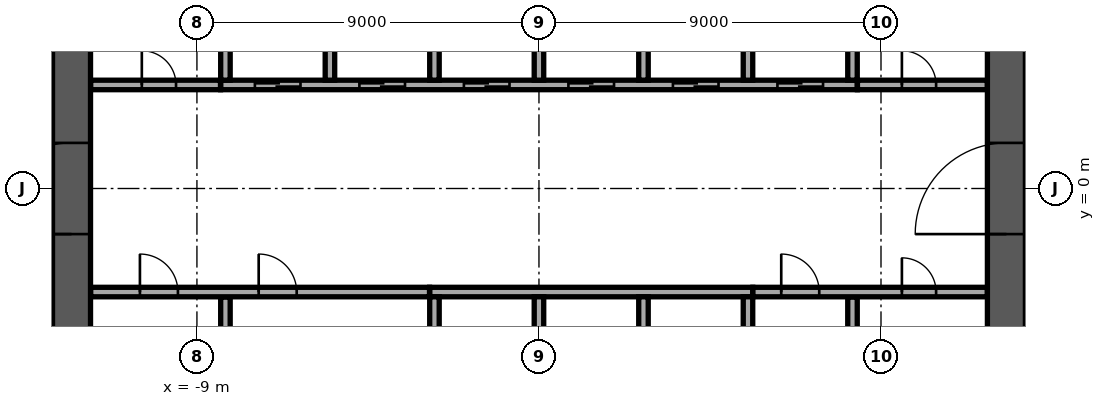
"""IFC4 building model, lengths in metres.
Left out: names, types, materials, properties, quantities, classifications, styles, units other than length and angle.
Written with IfcOpenShell. Run it as: python <this file> out.ifc"""

import sys

from ifc_helpers import new_model, si_unit, direction, frame, frame_2d, origin, place, context, subcontext, project, spatial, rectangle, extrude, element, fill, save


model = new_model("IFC4")
c1 = context("Model", 3, precision=1e-05, world=origin(), true_north=direction((0.0, 1.0)))
c2 = subcontext(c1, "Body", "Model", "MODEL_VIEW")
j1 = project(units=[si_unit("LENGTHUNIT", "METRE"), si_unit("PLANEANGLEUNIT", "RADIAN")], contexts=[c1])
p1 = place(None, origin())
s1 = spatial("IfcSite", under=j1, at=p1, CompositionType="ELEMENT")
p2 = place(p1, origin())
s2 = spatial("IfcBuilding", under=s1, at=p2, CompositionType="ELEMENT")
p3 = place(p2, frame((0.0, 0.0, 147.7)))
s3 = spatial("IfcBuildingStorey", under=s2, at=p3, CompositionType="ELEMENT", Elevation=147.7)
p4 = place(p3, frame((12.3, -11.8, 0.0), z_axis=(0.0, 0.0, 1.0), x_axis=(0.0, 1.0, 0.0)))
e1 = element("IfcWall", 1, at=p4, inside=s3, PredefinedType="SHEAR", context=c2, shape_type="SweptSolid", body=[
    extrude(rectangle(XDim=23.6, YDim=1.0, at=frame_2d((11.8, 0.0))), origin(), (0.0, 0.0, 1.0), 3.6),
])
p5 = place(p4, frame((10.6, 0.0, 0.0)))
e2 = element("IfcOpeningElement", 2, at=p5, cuts=e1, PredefinedType="OPENING", context=c2, shape_type="SweptSolid", body=[
    extrude(rectangle(XDim=2.4, YDim=2.4, at=frame_2d((1.2, 1.2))), frame((0.0, 0.51, 0.0), z_axis=(0.0, -1.0, 0.0), x_axis=(1.0, 0.0, 0.0)), (0.0, 0.0, 1.0), 1.02),
])
p6 = place(p3, frame((-12.3, -11.8, 0.0), z_axis=(0.0, 0.0, 1.0), x_axis=(0.0, 1.0, 0.0)))
e3 = element("IfcWall", 3, at=p6, inside=s3, PredefinedType="SHEAR", context=c2, shape_type="SweptSolid", body=[
    extrude(rectangle(XDim=23.6, YDim=1.0, at=frame_2d((11.8, 0.0))), origin(), (0.0, 0.0, 1.0), 3.6),
])
p7 = place(p6, frame((10.6, 0.0, 0.0)))
e4 = element("IfcOpeningElement", 4, at=p7, cuts=e3, PredefinedType="OPENING", context=c2, shape_type="SweptSolid", body=[
    extrude(rectangle(XDim=2.4, YDim=2.4, at=frame_2d((1.2, 1.2))), frame((0.0, 0.51, 0.0), z_axis=(0.0, -1.0, 0.0), x_axis=(1.0, 0.0, 0.0)), (0.0, 0.0, 1.0), 1.02),
])
p8 = place(p3, frame((-8.375, 2.725, 0.0), z_axis=(0.0, 0.0, 1.0), x_axis=(1.0, 0.0, 0.0)))
e5 = element("IfcWall", 5, at=p8, inside=s3, PredefinedType="SOLIDWALL", context=c2, shape_type="SweptSolid", body=[
    extrude(rectangle(XDim=16.75, YDim=0.25, at=frame_2d((8.375, 0.0))), origin(), (0.0, 0.0, 1.0), 3.6),
])
p9 = place(p8, frame((0.9, 0.0, 0.0)))
e6 = element("IfcOpeningElement", 6, at=p9, cuts=e5, PredefinedType="OPENING", context=c2, shape_type="SweptSolid", body=[
    extrude(rectangle(XDim=1.2, YDim=2.1, at=frame_2d((0.6, 1.05))), frame((0.0, 0.135, 0.0), z_axis=(0.0, -1.0, 0.0), x_axis=(1.0, 0.0, 0.0)), (0.0, 0.0, 1.0), 0.27),
])
p10 = place(p8, frame((3.65, 0.0, 0.0)))
e7 = element("IfcOpeningElement", 7, at=p10, cuts=e5, PredefinedType="OPENING", context=c2, shape_type="SweptSolid", body=[
    extrude(rectangle(XDim=1.2, YDim=2.1, at=frame_2d((0.6, 1.05))), frame((0.0, 0.135, 0.0), z_axis=(0.0, -1.0, 0.0), x_axis=(1.0, 0.0, 0.0)), (0.0, 0.0, 1.0), 0.27),
])
p11 = place(p8, frame((6.4, 0.0, 0.0)))
e8 = element("IfcOpeningElement", 8, at=p11, cuts=e5, PredefinedType="OPENING", context=c2, shape_type="SweptSolid", body=[
    extrude(rectangle(XDim=1.2, YDim=2.1, at=frame_2d((0.6, 1.05))), frame((0.0, 0.135, 0.0), z_axis=(0.0, -1.0, 0.0), x_axis=(1.0, 0.0, 0.0)), (0.0, 0.0, 1.0), 0.27),
])
p12 = place(p8, frame((9.15, 0.0, 0.0)))
e9 = element("IfcOpeningElement", 9, at=p12, cuts=e5, PredefinedType="OPENING", context=c2, shape_type="SweptSolid", body=[
    extrude(rectangle(XDim=1.2, YDim=2.1, at=frame_2d((0.6, 1.05))), frame((0.0, 0.135, 0.0), z_axis=(0.0, -1.0, 0.0), x_axis=(1.0, 0.0, 0.0)), (0.0, 0.0, 1.0), 0.27),
])
p13 = place(p8, frame((11.9, 0.0, 0.0)))
e10 = element("IfcOpeningElement", 10, at=p13, cuts=e5, PredefinedType="OPENING", context=c2, shape_type="SweptSolid", body=[
    extrude(rectangle(XDim=1.2, YDim=2.1, at=frame_2d((0.6, 1.05))), frame((0.0, 0.135, 0.0), z_axis=(0.0, -1.0, 0.0), x_axis=(1.0, 0.0, 0.0)), (0.0, 0.0, 1.0), 0.27),
])
p14 = place(p8, frame((14.65, 0.0, 0.0)))
e11 = element("IfcOpeningElement", 11, at=p14, cuts=e5, PredefinedType="OPENING", context=c2, shape_type="SweptSolid", body=[
    extrude(rectangle(XDim=1.2, YDim=2.1, at=frame_2d((0.6, 1.05))), frame((0.0, 0.135, 0.0), z_axis=(0.0, -1.0, 0.0), x_axis=(1.0, 0.0, 0.0)), (0.0, 0.0, 1.0), 0.27),
])
for number, where, z_axis, x_axis in (
    (12, (-8.25, 2.85, 0.0), (0.0, 0.0, 1.0), (0.0, 1.0, 0.0)),
    (13, (-5.5, 2.85, 0.0), (0.0, 0.0, 1.0), (0.0, 1.0, 0.0)),
    (14, (-2.75, 2.85, 0.0), (0.0, 0.0, 1.0), (0.0, 1.0, 0.0)),
    (15, (0.0, 2.85, 0.0), (0.0, 0.0, 1.0), (0.0, 1.0, 0.0)),
    (16, (2.75, 2.85, 0.0), (0.0, 0.0, 1.0), (0.0, 1.0, 0.0)),
    (17, (5.5, 2.85, 0.0), (0.0, 0.0, 1.0), (0.0, 1.0, 0.0)),
    (18, (8.25, 2.85, 0.0), (0.0, 0.0, 1.0), (0.0, 1.0, 0.0)),
):
    element("IfcWall", number, at=place(p3, frame(where, z_axis=z_axis, x_axis=x_axis)), inside=s3, PredefinedType="SOLIDWALL", context=c2, shape_type="SweptSolid", body=[
        extrude(rectangle(XDim=2.7, YDim=0.25, at=frame_2d((1.35, 0.0))), origin(), (0.0, 0.0, 1.0), 3.6),
    ])
p15 = place(p3, frame((-2.875, -2.725, 0.0), z_axis=(0.0, 0.0, 1.0), x_axis=(1.0, 0.0, 0.0)))
e19 = element("IfcWall", 19, at=p15, inside=s3, PredefinedType="SOLIDWALL", context=c2, shape_type="SweptSolid", body=[
    extrude(rectangle(XDim=8.5, YDim=0.25, at=frame_2d((4.25, 0.0))), origin(), (0.0, 0.0, 1.0), 3.6),
])
for number, where, z_axis, x_axis in (
    (20, (-2.75, -5.55, 0.0), (0.0, 0.0, 1.0), (0.0, 1.0, 0.0)),
    (21, (0.0, -5.55, 0.0), (0.0, 0.0, 1.0), (0.0, 1.0, 0.0)),
    (22, (2.75, -5.55, 0.0), (0.0, 0.0, 1.0), (0.0, 1.0, 0.0)),
    (23, (5.5, -5.55, 0.0), (0.0, 0.0, 1.0), (0.0, 1.0, 0.0)),
):
    element("IfcWall", number, at=place(p3, frame(where, z_axis=z_axis, x_axis=x_axis)), inside=s3, PredefinedType="SOLIDWALL", context=c2, shape_type="SweptSolid", body=[
        extrude(rectangle(XDim=2.7, YDim=0.25, at=frame_2d((1.35, 0.0))), origin(), (0.0, 0.0, 1.0), 3.6),
    ])
for number, where, z_axis, x_axis in (
    (24, (-8.25, -5.545, 0.0), (0.0, 0.0, 1.0), (0.0, 1.0, 0.0)),
    (25, (8.25, -5.545, 0.0), (0.0, 0.0, 1.0), (0.0, 1.0, 0.0)),
):
    element("IfcWall", number, at=place(p3, frame(where, z_axis=z_axis, x_axis=x_axis)), inside=s3, PredefinedType="PARTITIONING", context=c2, shape_type="SweptSolid", body=[
        extrude(rectangle(XDim=2.69, YDim=0.25, at=frame_2d((1.345, 0.0))), origin(), (0.0, 0.0, 1.0), 3.6),
    ])
p16 = place(p3, frame((-11.795, -2.725, 0.0), z_axis=(0.0, 0.0, 1.0), x_axis=(1.0, 0.0, 0.0)))
e26 = element("IfcWall", 26, at=p16, inside=s3, PredefinedType="PARTITIONING", context=c2, shape_type="SweptSolid", body=[
    extrude(rectangle(XDim=8.915, YDim=0.25, at=frame_2d((4.458, 0.0))), origin(), (0.0, 0.0, 1.0), 3.6),
])
p17 = place(p16, frame((1.295, 0.0, 0.0)))
e27 = element("IfcOpeningElement", 27, at=p17, cuts=e26, PredefinedType="OPENING", context=c2, shape_type="SweptSolid", body=[
    extrude(rectangle(XDim=1.0, YDim=2.1, at=frame_2d((0.5, 1.05))), frame((0.0, 0.135, 0.0), z_axis=(0.0, -1.0, 0.0), x_axis=(1.0, 0.0, 0.0)), (0.0, 0.0, 1.0), 0.27),
])
p18 = place(p16, frame((4.42, 0.0, 0.0)))
e28 = element("IfcOpeningElement", 28, at=p18, cuts=e26, PredefinedType="OPENING", context=c2, shape_type="SweptSolid", body=[
    extrude(rectangle(XDim=1.0, YDim=2.1, at=frame_2d((0.5, 1.05))), frame((0.0, 0.135, 0.0), z_axis=(0.0, -1.0, 0.0), x_axis=(1.0, 0.0, 0.0)), (0.0, 0.0, 1.0), 0.27),
])
p19 = place(p3, frame((5.63, -2.725, 0.0), z_axis=(0.0, 0.0, 1.0), x_axis=(1.0, 0.0, 0.0)))
e29 = element("IfcWall", 29, at=p19, inside=s3, PredefinedType="PARTITIONING", context=c2, shape_type="SweptSolid", body=[
    extrude(rectangle(XDim=6.165, YDim=0.25, at=frame_2d((3.083, 0.0))), origin(), (0.0, 0.0, 1.0), 3.6),
])
p20 = place(p19, frame((0.745, 0.0, 0.0)))
e30 = element("IfcOpeningElement", 30, at=p20, cuts=e29, PredefinedType="OPENING", context=c2, shape_type="SweptSolid", body=[
    extrude(rectangle(XDim=1.0, YDim=2.1, at=frame_2d((0.5, 1.05))), frame((0.0, 0.135, 0.0), z_axis=(0.0, -1.0, 0.0), x_axis=(1.0, 0.0, 0.0)), (0.0, 0.0, 1.0), 0.27),
])
p21 = place(p19, frame((3.92, 0.0, 0.0)))
e31 = element("IfcOpeningElement", 31, at=p21, cuts=e29, PredefinedType="OPENING", context=c2, shape_type="SweptSolid", body=[
    extrude(rectangle(XDim=0.9, YDim=2.1, at=frame_2d((0.45, 1.05))), frame((0.0, 0.135, 0.0), z_axis=(0.0, -1.0, 0.0), x_axis=(1.0, 0.0, 0.0)), (0.0, 0.0, 1.0), 0.27),
])
p22 = place(p3, frame((-11.795, 2.725, 0.0), z_axis=(0.0, 0.0, 1.0), x_axis=(1.0, 0.0, 0.0)))
e32 = element("IfcWall", 32, at=p22, inside=s3, PredefinedType="PARTITIONING", context=c2, shape_type="SweptSolid", body=[
    extrude(rectangle(XDim=3.415, YDim=0.25, at=frame_2d((1.708, 0.0))), origin(), (0.0, 0.0, 1.0), 3.6),
])
p23 = place(p22, frame((1.345, 0.0, 0.0)))
e33 = element("IfcOpeningElement", 33, at=p23, cuts=e32, PredefinedType="OPENING", context=c2, shape_type="SweptSolid", body=[
    extrude(rectangle(XDim=0.9, YDim=2.1, at=frame_2d((0.45, 1.05))), frame((0.0, 0.135, 0.0), z_axis=(0.0, -1.0, 0.0), x_axis=(1.0, 0.0, 0.0)), (0.0, 0.0, 1.0), 0.27),
])
p24 = place(p3, frame((8.38, 2.725, 0.0), z_axis=(0.0, 0.0, 1.0), x_axis=(1.0, 0.0, 0.0)))
e34 = element("IfcWall", 34, at=p24, inside=s3, PredefinedType="PARTITIONING", context=c2, shape_type="SweptSolid", body=[
    extrude(rectangle(XDim=3.415, YDim=0.25, at=frame_2d((1.708, 0.0))), origin(), (0.0, 0.0, 1.0), 3.6),
])
p25 = place(p24, frame((1.17, 0.0, 0.0)))
e35 = element("IfcOpeningElement", 35, at=p25, cuts=e34, PredefinedType="OPENING", context=c2, shape_type="SweptSolid", body=[
    extrude(rectangle(XDim=0.9, YDim=2.1, at=frame_2d((0.45, 1.05))), frame((0.0, 0.135, 0.0), z_axis=(0.0, -1.0, 0.0), x_axis=(1.0, 0.0, 0.0)), (0.0, 0.0, 1.0), 0.27),
])
p26 = place(p3, frame((-26.388, 0.711, 0.0), z_axis=(0.0, 0.0, 1.0), x_axis=(0.515060503771, -0.857153823684, 0.0)))
e36 = element("IfcWall", 36, at=p26, inside=s3, PredefinedType="PARTITIONING", context=c2, shape_type="SweptSolid", body=[
    extrude(rectangle(XDim=28.475, YDim=0.15, at=frame_2d((14.238, 0.0))), origin(), (0.0, 0.0, 1.0), 3.15),
])
p27 = place(p26, frame((9.447, 0.0, 0.0)))
e37 = element("IfcOpeningElement", 37, at=p27, cuts=e36, PredefinedType="OPENING", context=c2, shape_type="SweptSolid", body=[
    extrude(rectangle(XDim=1.0, YDim=2.1, at=frame_2d((0.5, 1.05))), frame((0.0, 0.085, 0.0), z_axis=(0.0, -1.0, 0.0), x_axis=(1.0, 0.0, 0.0)), (0.0, 0.0, 1.0), 0.17),
])
p28 = place(p26, frame((17.021, 0.0, 0.0)))
e38 = element("IfcOpeningElement", 38, at=p28, cuts=e36, PredefinedType="OPENING", context=c2, shape_type="SweptSolid", body=[
    extrude(rectangle(XDim=1.0, YDim=2.1, at=frame_2d((0.5, 1.05))), frame((0.0, 0.085, 0.0), z_axis=(0.0, -1.0, 0.0), x_axis=(1.0, 0.0, 0.0)), (0.0, 0.0, 1.0), 0.17),
])
p29 = place(p3, frame((11.76, 23.633, 0.0), z_axis=(0.0, 0.0, 1.0), x_axis=(0.515060503771, -0.857153823684, 0.0)))
e39 = element("IfcWall", 39, at=p29, inside=s3, PredefinedType="PARTITIONING", context=c2, shape_type="SweptSolid", body=[
    extrude(rectangle(XDim=28.475, YDim=0.15, at=frame_2d((14.238, 0.0))), origin(), (0.0, 0.0, 1.0), 3.15),
])
p30 = place(p29, frame((12.149, 0.0, 0.0)))
e40 = element("IfcOpeningElement", 40, at=p30, cuts=e39, PredefinedType="OPENING", context=c2, shape_type="SweptSolid", body=[
    extrude(rectangle(XDim=1.0, YDim=2.1, at=frame_2d((0.5, 1.05))), frame((0.0, 0.085, 0.0), z_axis=(0.0, -1.0, 0.0), x_axis=(1.0, 0.0, 0.0)), (0.0, 0.0, 1.0), 0.17),
])
p31 = place(p29, frame((19.62, 0.0, 0.0)))
e41 = element("IfcOpeningElement", 41, at=p31, cuts=e39, PredefinedType="OPENING", context=c2, shape_type="SweptSolid", body=[
    extrude(rectangle(XDim=1.0, YDim=2.1, at=frame_2d((0.5, 1.05))), frame((0.0, 0.085, 0.0), z_axis=(0.0, -1.0, 0.0), x_axis=(1.0, 0.0, 0.0)), (0.0, 0.0, 1.0), 0.17),
])
p32 = place(p29, frame((26.005, 0.0, 0.0)))
e42 = element("IfcOpeningElement", 42, at=p32, cuts=e39, PredefinedType="OPENING", context=c2, shape_type="SweptSolid", body=[
    extrude(rectangle(XDim=1.8, YDim=2.1, at=frame_2d((0.9, 1.05))), frame((0.0, 0.085, 0.0), z_axis=(0.0, -1.0, 0.0), x_axis=(1.0, 0.0, 0.0)), (0.0, 0.0, 1.0), 0.17),
])
p33 = place(p5, origin())
e43 = element("IfcDoor", 43, at=p33, inside=s3, OperationType="SINGLE_SWING_LEFT", PredefinedType="DOOR", context=c2, shape_type="SweptSolid", body=[
    extrude(rectangle(XDim=2.4, YDim=2.4, at=frame_2d((1.2, 1.2))), frame((0.0, 0.025, 0.0), z_axis=(0.0, -1.0, 0.0), x_axis=(1.0, 0.0, 0.0)), (0.0, 0.0, 1.0), 0.05),
])
fill(e2, e43)
p34 = place(p7, origin())
e44 = element("IfcDoor", 44, at=p34, inside=s3, OperationType="SINGLE_SWING_LEFT", PredefinedType="DOOR", context=c2, shape_type="SweptSolid", body=[
    extrude(rectangle(XDim=2.4, YDim=2.4, at=frame_2d((1.2, 1.2))), frame((0.0, 0.025, 0.0), z_axis=(0.0, -1.0, 0.0), x_axis=(1.0, 0.0, 0.0)), (0.0, 0.0, 1.0), 0.05),
])
fill(e4, e44)
p35 = place(p9, origin())
e45 = element("IfcDoor", 45, at=p35, inside=s3, OperationType="DOUBLE_DOOR_SLIDING", PredefinedType="DOOR", context=c2, shape_type="SweptSolid", body=[
    extrude(rectangle(XDim=1.2, YDim=2.1, at=frame_2d((0.6, 1.05))), frame((0.0, 0.025, 0.0), z_axis=(0.0, -1.0, 0.0), x_axis=(1.0, 0.0, 0.0)), (0.0, 0.0, 1.0), 0.05),
])
fill(e6, e45)
p36 = place(p10, origin())
e46 = element("IfcDoor", 46, at=p36, inside=s3, OperationType="DOUBLE_DOOR_SLIDING", PredefinedType="DOOR", context=c2, shape_type="SweptSolid", body=[
    extrude(rectangle(XDim=1.2, YDim=2.1, at=frame_2d((0.6, 1.05))), frame((0.0, 0.025, 0.0), z_axis=(0.0, -1.0, 0.0), x_axis=(1.0, 0.0, 0.0)), (0.0, 0.0, 1.0), 0.05),
])
fill(e7, e46)
p37 = place(p11, origin())
e47 = element("IfcDoor", 47, at=p37, inside=s3, OperationType="DOUBLE_DOOR_SLIDING", PredefinedType="DOOR", context=c2, shape_type="SweptSolid", body=[
    extrude(rectangle(XDim=1.2, YDim=2.1, at=frame_2d((0.6, 1.05))), frame((0.0, 0.025, 0.0), z_axis=(0.0, -1.0, 0.0), x_axis=(1.0, 0.0, 0.0)), (0.0, 0.0, 1.0), 0.05),
])
fill(e8, e47)
p38 = place(p12, origin())
e48 = element("IfcDoor", 48, at=p38, inside=s3, OperationType="DOUBLE_DOOR_SLIDING", PredefinedType="DOOR", context=c2, shape_type="SweptSolid", body=[
    extrude(rectangle(XDim=1.2, YDim=2.1, at=frame_2d((0.6, 1.05))), frame((0.0, 0.025, 0.0), z_axis=(0.0, -1.0, 0.0), x_axis=(1.0, 0.0, 0.0)), (0.0, 0.0, 1.0), 0.05),
])
fill(e9, e48)
p39 = place(p13, origin())
e49 = element("IfcDoor", 49, at=p39, inside=s3, OperationType="DOUBLE_DOOR_SLIDING", PredefinedType="DOOR", context=c2, shape_type="SweptSolid", body=[
    extrude(rectangle(XDim=1.2, YDim=2.1, at=frame_2d((0.6, 1.05))), frame((0.0, 0.025, 0.0), z_axis=(0.0, -1.0, 0.0), x_axis=(1.0, 0.0, 0.0)), (0.0, 0.0, 1.0), 0.05),
])
fill(e10, e49)
p40 = place(p14, origin())
e50 = element("IfcDoor", 50, at=p40, inside=s3, OperationType="DOUBLE_DOOR_SLIDING", PredefinedType="DOOR", context=c2, shape_type="SweptSolid", body=[
    extrude(rectangle(XDim=1.2, YDim=2.1, at=frame_2d((0.6, 1.05))), frame((0.0, 0.025, 0.0), z_axis=(0.0, -1.0, 0.0), x_axis=(1.0, 0.0, 0.0)), (0.0, 0.0, 1.0), 0.05),
])
fill(e11, e50)
p41 = place(p17, origin())
e51 = element("IfcDoor", 51, at=p41, inside=s3, OperationType="SINGLE_SWING_LEFT", PredefinedType="DOOR", context=c2, shape_type="SweptSolid", body=[
    extrude(rectangle(XDim=1.0, YDim=2.1, at=frame_2d((0.5, 1.05))), frame((0.0, 0.025, 0.0), z_axis=(0.0, -1.0, 0.0), x_axis=(1.0, 0.0, 0.0)), (0.0, 0.0, 1.0), 0.05),
])
fill(e27, e51)
p42 = place(p20, origin())
e52 = element("IfcDoor", 52, at=p42, inside=s3, OperationType="SINGLE_SWING_LEFT", PredefinedType="DOOR", context=c2, shape_type="SweptSolid", body=[
    extrude(rectangle(XDim=1.0, YDim=2.1, at=frame_2d((0.5, 1.05))), frame((0.0, 0.025, 0.0), z_axis=(0.0, -1.0, 0.0), x_axis=(1.0, 0.0, 0.0)), (0.0, 0.0, 1.0), 0.05),
])
fill(e30, e52)
p43 = place(p25, origin())
e53 = element("IfcDoor", 53, at=p43, inside=s3, OperationType="SINGLE_SWING_LEFT", PredefinedType="DOOR", context=c2, shape_type="SweptSolid", body=[
    extrude(rectangle(XDim=0.9, YDim=2.1, at=frame_2d((0.45, 1.05))), frame((0.0, 0.025, 0.0), z_axis=(0.0, -1.0, 0.0), x_axis=(1.0, 0.0, 0.0)), (0.0, 0.0, 1.0), 0.05),
])
fill(e35, e53)
p44 = place(p21, origin())
e54 = element("IfcDoor", 54, at=p44, inside=s3, OperationType="SINGLE_SWING_LEFT", PredefinedType="DOOR", context=c2, shape_type="SweptSolid", body=[
    extrude(rectangle(XDim=0.9, YDim=2.1, at=frame_2d((0.45, 1.05))), frame((0.0, 0.025, 0.0), z_axis=(0.0, -1.0, 0.0), x_axis=(1.0, 0.0, 0.0)), (0.0, 0.0, 1.0), 0.05),
])
fill(e31, e54)
p45 = place(p23, origin())
e55 = element("IfcDoor", 55, at=p45, inside=s3, OperationType="SINGLE_SWING_LEFT", PredefinedType="DOOR", context=c2, shape_type="SweptSolid", body=[
    extrude(rectangle(XDim=0.9, YDim=2.1, at=frame_2d((0.45, 1.05))), frame((0.0, 0.025, 0.0), z_axis=(0.0, -1.0, 0.0), x_axis=(1.0, 0.0, 0.0)), (0.0, 0.0, 1.0), 0.05),
])
fill(e33, e55)
p46 = place(p18, origin())
e56 = element("IfcDoor", 56, at=p46, inside=s3, OperationType="SINGLE_SWING_LEFT", PredefinedType="DOOR", context=c2, shape_type="SweptSolid", body=[
    extrude(rectangle(XDim=1.0, YDim=2.1, at=frame_2d((0.5, 1.05))), frame((0.0, 0.025, 0.0), z_axis=(0.0, -1.0, 0.0), x_axis=(1.0, 0.0, 0.0)), (0.0, 0.0, 1.0), 0.05),
])
fill(e28, e56)
save(model, sys.argv[1])
